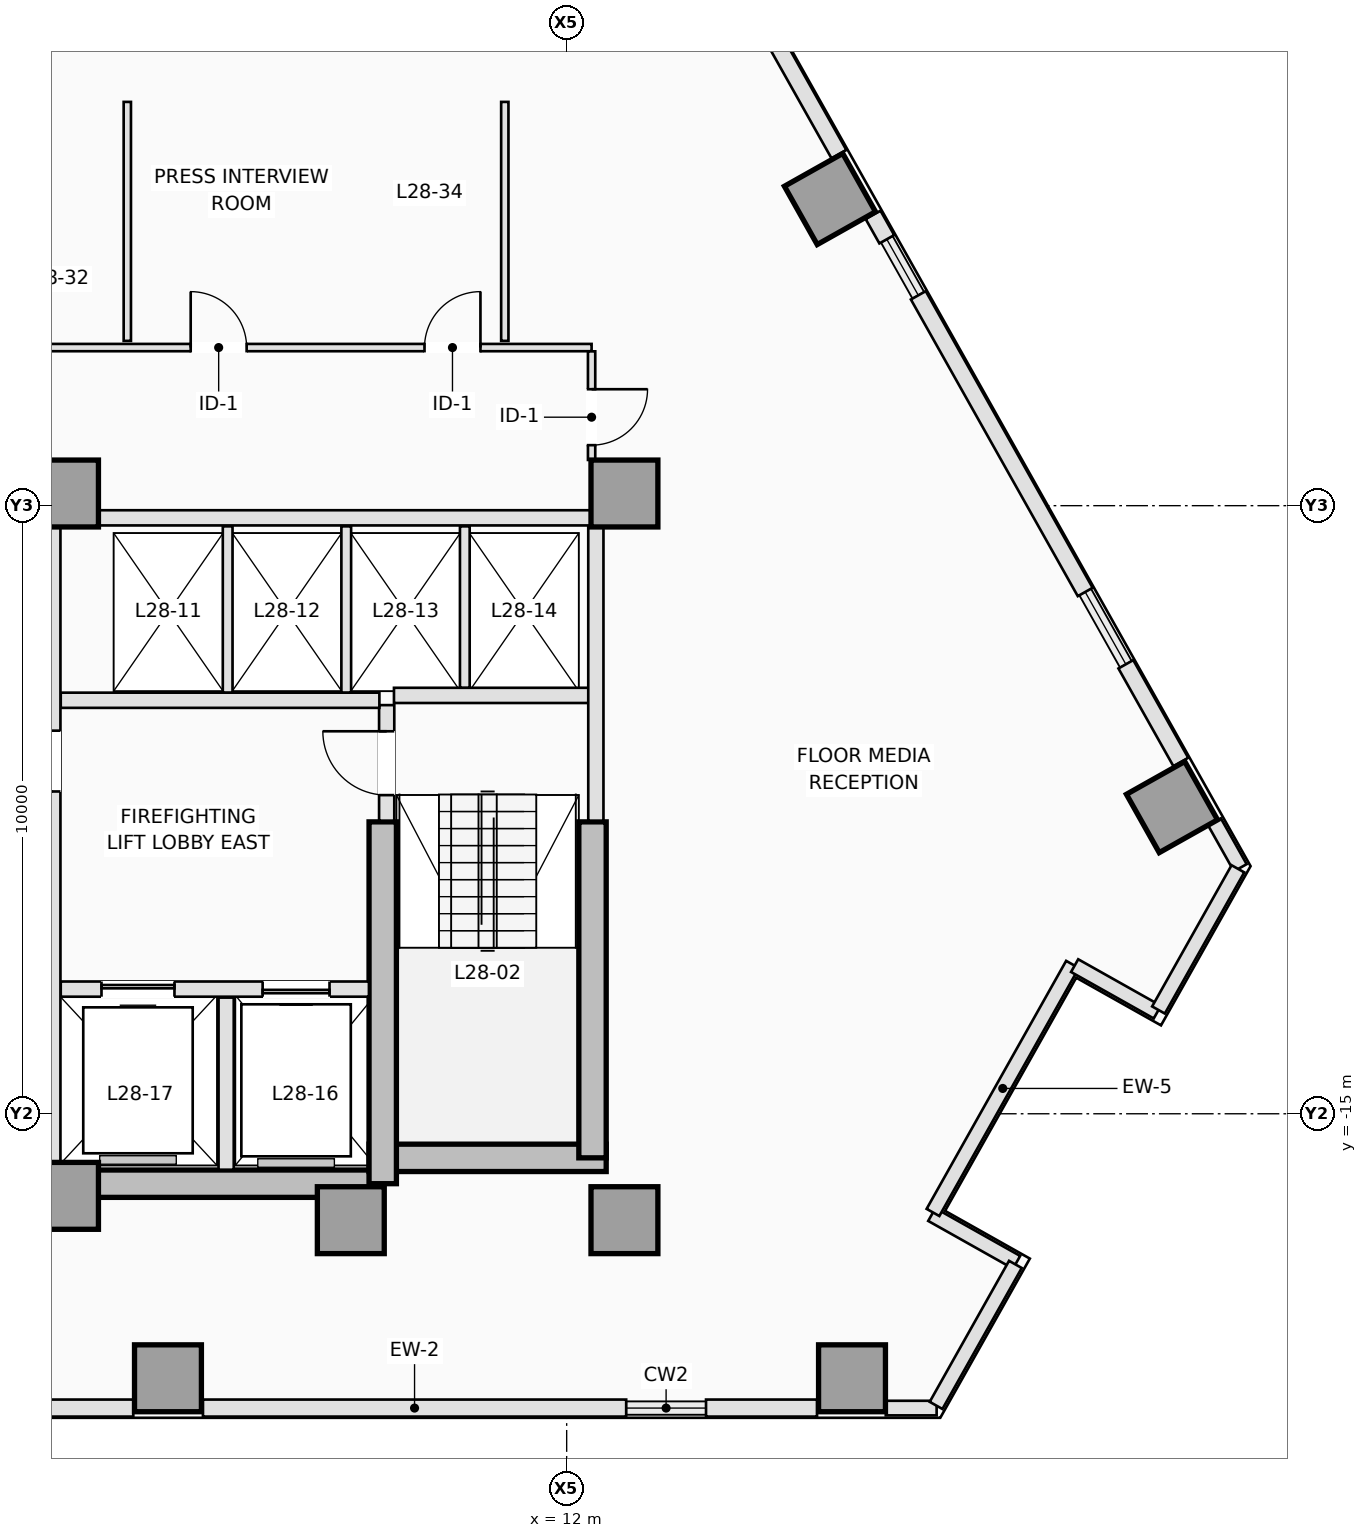
"""IFC4 building model, lengths in metres.
Left out: names, types, materials, properties, quantities, classifications, styles, units other than length and angle.
Written with IfcOpenShell. Run it as: python <this file> out.ifc"""

import sys

from ifc_helpers import new_model, si_unit, direction, frame, frame_2d, origin, origin_2d, place, context, subcontext, project, spatial, rectangle, extrude, element, fill, save


model = new_model("IFC4")
c1 = context("Model", 3, precision=1e-05, world=origin(), true_north=direction((0.0, 1.0)))
c2 = subcontext(c1, "Body", "Model", "MODEL_VIEW")
j1 = project(units=[si_unit("LENGTHUNIT", "METRE"), si_unit("PLANEANGLEUNIT", "RADIAN")], contexts=[c1])
p1 = place(None, origin())
s1 = spatial("IfcSite", under=j1, at=p1, CompositionType="ELEMENT")
p2 = place(p1, origin())
s2 = spatial("IfcBuilding", under=s1, at=p2, CompositionType="ELEMENT")
p3 = place(p2, frame((0.0, 0.0, 105.5)))
s3 = spatial("IfcBuildingStorey", under=s2, at=p3, CompositionType="ELEMENT", Elevation=105.5)
p4 = place(p3, frame((3.75, -16.15, 0.0), z_axis=(0.0, 0.0, 1.0), x_axis=(1.0, 0.0, 0.0)))
e1 = element("IfcWall", 1, at=p4, inside=s3, PredefinedType="SHEAR", context=c2, shape_type="SweptSolid", body=[
    extrude(rectangle(XDim=5.225, YDim=0.45, at=frame_2d((2.613, 0.0))), origin(), (0.0, 0.0, 1.0), 3.5),
])
p5 = place(p3, frame((8.75, -15.725, 0.0), z_axis=(0.0, 0.0, 1.0), x_axis=(1.0, 0.0, 0.0)))
e2 = element("IfcWall", 2, at=p5, inside=s3, PredefinedType="SHEAR", context=c2, shape_type="SweptSolid", body=[
    extrude(rectangle(XDim=3.9, YDim=0.45, at=frame_2d((1.95, 0.0))), origin(), (0.0, 0.0, 1.0), 3.5),
])
p6 = place(p3, frame((12.425, -15.725, 0.0), z_axis=(0.0, 0.0, 1.0), x_axis=(0.0, 1.0, 0.0)))
e3 = element("IfcWall", 3, at=p6, inside=s3, PredefinedType="SHEAR", context=c2, shape_type="SweptSolid", body=[
    extrude(rectangle(XDim=5.525, YDim=0.45, at=frame_2d((2.763, 0.0))), origin(), (0.0, 0.0, 1.0), 3.5),
])
p7 = place(p3, frame((8.975, -16.15, 0.0), z_axis=(0.0, 0.0, 1.0), x_axis=(0.0, 1.0, 0.0)))
e4 = element("IfcWall", 4, at=p7, inside=s3, PredefinedType="SHEAR", context=c2, shape_type="SweptSolid", body=[
    extrude(rectangle(XDim=5.95, YDim=0.45, at=frame_2d((2.975, 0.0))), origin(), (0.0, 0.0, 1.0), 3.5),
])
for number, where, z_axis, x_axis in (
    (5, (3.75, -16.35, 0.0), (0.0, 0.0, 1.0), (1.0, 0.0, 0.0)),
    (6, (8.45, -16.75, 0.0), (0.0, 0.0, 1.0), (1.0, 0.0, 0.0)),
    (7, (12.95, -16.75, 0.0), (0.0, 0.0, 1.0), (1.0, 0.0, 0.0)),
    (8, (3.75, -4.8, 0.0), (0.0, 0.0, 1.0), (1.0, 0.0, 0.0)),
    (9, (12.95, -4.8, 0.0), (0.0, 0.0, 1.0), (1.0, 0.0, 0.0)),
    (10, (5.443, -19.35, 0.0), (0.0, 0.0, 1.0), (0.0, 1.0, 0.0)),
    (11, (16.692, -19.35, 0.0), (0.0, 0.0, 1.0), (0.0, 1.0, 0.0)),
    (12, (21.955, -9.957, 0.0), (0.0, 0.0, 1.0), (0.872, 0.49, 0.0)),
    (13, (16.33, 0.043, 0.0), (0.0, 0.0, 1.0), (0.872, 0.49, 0.0)),
):
    element("IfcColumn", number, at=place(p3, frame(where, z_axis=z_axis, x_axis=x_axis)), inside=s3, PredefinedType="COLUMN", context=c2, shape_type="SweptSolid", body=[
        extrude(rectangle(XDim=1.1, YDim=1.1, at=origin_2d()), origin(), (0.0, 0.0, 1.0), 3.5),
    ])
p8 = place(p3, frame((18.084, -19.84, 0.0), z_axis=(0.0, 0.0, 1.0), x_axis=(-1.0, 0.0, 0.0)))
e14 = element("IfcWall", 14, at=p8, inside=s3, PredefinedType="STANDARD", context=c2, shape_type="SweptSolid", body=[
    extrude(rectangle(XDim=0.836, YDim=0.24, at=frame_2d((0.418, 0.0))), origin(), (0.0, 0.0, 1.0), 3.25),
])
p9 = place(p3, frame((16.117, -19.84, 0.0), z_axis=(0.0, 0.0, 1.0), x_axis=(-1.0, 0.0, 0.0)))
e15 = element("IfcWall", 15, at=p9, inside=s3, PredefinedType="STANDARD", context=c2, shape_type="SweptSolid", body=[
    extrude(rectangle(XDim=1.826, YDim=0.28, at=frame_2d((0.913, 0.0))), origin(), (0.0, 0.0, 1.0), 3.25),
])
p10 = place(p3, frame((12.979, -19.84, 0.0), z_axis=(0.0, 0.0, 1.0), x_axis=(-1.0, 0.0, 0.0)))
e16 = element("IfcWall", 16, at=p10, inside=s3, PredefinedType="STANDARD", context=c2, shape_type="SweptSolid", body=[
    extrude(rectangle(XDim=6.96, YDim=0.28, at=frame_2d((3.48, 0.0))), origin(), (0.0, 0.0, 1.0), 3.25),
])
p11 = place(p3, frame((4.873, -19.84, 0.0), z_axis=(0.0, 0.0, 1.0), x_axis=(-1.0, 0.0, 0.0)))
e17 = element("IfcWall", 17, at=p11, inside=s3, PredefinedType="STANDARD", context=c2, shape_type="SweptSolid", body=[
    extrude(rectangle(XDim=4.217, YDim=0.28, at=frame_2d((2.108, 0.0))), origin(), (0.0, 0.0, 1.0), 3.25),
])
p12 = place(p3, frame((22.654, -10.2, 0.0), z_axis=(0.0, 0.0, 1.0), x_axis=(0.490355003566, -0.871522788272, 0.0)))
e18 = element("IfcWall", 18, at=p12, inside=s3, PredefinedType="STANDARD", context=c2, shape_type="SweptSolid", body=[
    extrude(rectangle(XDim=0.865, YDim=0.24, at=frame_2d((0.433, 0.0))), origin(), (0.0, 0.0, 1.0), 3.25),
])
p13 = place(p3, frame((17.039, -0.218, 0.0), z_axis=(0.0, 0.0, 1.0), x_axis=(0.490009165718, -0.871717280724, 0.0)))
e19 = element("IfcWall", 19, at=p13, inside=s3, PredefinedType="STANDARD", context=c2, shape_type="SweptSolid", body=[
    extrude(rectangle(XDim=0.46, YDim=0.28, at=frame_2d((0.23, 0.0))), origin(), (0.0, 0.0, 1.0), 3.25),
])
p14 = place(p3, frame((17.783, -1.541, 0.0), z_axis=(0.0, 0.0, 1.0), x_axis=(0.490265381388, -0.871573207374, 0.0)))
e20 = element("IfcWall", 20, at=p14, inside=s3, PredefinedType="STANDARD", context=c2, shape_type="SweptSolid", body=[
    extrude(rectangle(XDim=5.597, YDim=0.28, at=frame_2d((2.799, 0.0))), origin(), (0.0, 0.0, 1.0), 3.25),
])
p15 = place(p3, frame((21.196, -7.608, 0.0), z_axis=(0.0, 0.0, 1.0), x_axis=(0.490280102884, -0.871564926277, 0.0)))
e21 = element("IfcWall", 21, at=p15, inside=s3, PredefinedType="STANDARD", context=c2, shape_type="SweptSolid", body=[
    extrude(rectangle(XDim=1.844, YDim=0.28, at=frame_2d((0.922, 0.0))), origin(), (0.0, 0.0, 1.0), 3.25),
])
p16 = place(p3, frame((14.37, 4.527, 0.0), z_axis=(0.0, 0.0, 1.0), x_axis=(0.490293592365, -0.871557337922, 0.0)))
e22 = element("IfcWall", 22, at=p16, inside=s3, PredefinedType="STANDARD", context=c2, shape_type="SweptSolid", body=[
    extrude(rectangle(XDim=4.299, YDim=0.28, at=frame_2d((2.15, 0.0))), origin(), (0.0, 0.0, 1.0), 3.25),
])
p17 = place(p3, frame((19.399, -17.442, 0.0), z_axis=(0.0, 0.0, 1.0), x_axis=(-0.871575537125, 0.490261239633, 0.0)))
e23 = element("IfcWall", 23, at=p17, inside=s3, PredefinedType="STANDARD", context=c2, shape_type="SweptSolid", body=[
    extrude(rectangle(XDim=1.6, YDim=0.24, at=frame_2d((0.8, 0.0))), origin(), (0.0, 0.0, 1.0), 3.25),
])
p18 = place(p3, frame((18.024, -16.623, 0.0), z_axis=(0.0, 0.0, 1.0), x_axis=(0.490273623647, 0.871568571001, 0.0)))
e24 = element("IfcWall", 24, at=p18, inside=s3, PredefinedType="STANDARD", context=c2, shape_type="SweptSolid", body=[
    extrude(rectangle(XDim=4.68, YDim=0.24, at=frame_2d((2.34, 0.0))), origin(), (0.0, 0.0, 1.0), 2.722),
])
p19 = place(p3, frame((20.354, -12.564, 0.0), z_axis=(0.0, 0.0, 1.0), x_axis=(0.871546278971, -0.490313250496, 0.0)))
e25 = element("IfcWall", 25, at=p19, inside=s3, PredefinedType="STANDARD", context=c2, shape_type="SweptSolid", body=[
    extrude(rectangle(XDim=1.56, YDim=0.24, at=frame_2d((0.78, 0.0))), origin(), (0.0, 0.0, 1.0), 3.25),
])
p20 = place(p3, frame((21.733, -13.294, 0.0), z_axis=(0.0, 0.0, 1.0), x_axis=(0.490265590412, 0.871573089797, 0.0)))
e26 = element("IfcWall", 26, at=p20, inside=s3, PredefinedType="STANDARD", context=c2, shape_type="SweptSolid", body=[
    extrude(rectangle(XDim=2.664, YDim=0.24, at=frame_2d((1.332, 0.0))), origin(), (0.0, 0.0, 1.0), 3.25),
])
p21 = place(p3, frame((18.075, -19.796, 0.0), z_axis=(0.0, 0.0, 1.0), x_axis=(0.490248170584, 0.871582888335, 0.0)))
e27 = element("IfcWall", 27, at=p21, inside=s3, PredefinedType="STANDARD", context=c2, shape_type="SweptSolid", body=[
    extrude(rectangle(XDim=2.661, YDim=0.24, at=frame_2d((1.331, 0.0))), origin(), (0.0, 0.0, 1.0), 3.25),
])
p22 = place(p3, frame((9.04, -10.18, 0.0), z_axis=(0.0, 0.0, 1.0), x_axis=(0.0, 1.0, 0.0)))
e28 = element("IfcWall", 28, at=p22, inside=s3, PredefinedType="PARTITIONING", context=c2, shape_type="SweptSolid", body=[
    extrude(rectangle(XDim=1.9, YDim=0.25, at=frame_2d((0.95, 0.0))), origin(), (0.0, 0.0, 1.0), 3.25),
])
p23 = place(p22, frame((0.42, 0.0, 0.0)))
e29 = element("IfcOpeningElement", 29, at=p23, cuts=e28, PredefinedType="OPENING", context=c2, shape_type="SweptSolid", body=[
    extrude(rectangle(XDim=1.05, YDim=2.15, at=frame_2d((0.525, 1.075))), frame((0.0, 0.135, 0.0), z_axis=(0.0, -1.0, 0.0), x_axis=(1.0, 0.0, 0.0)), (0.0, 0.0, 1.0), 0.27),
])
p24 = place(p3, frame((9.16, -8.12, 0.0), z_axis=(0.0, 0.0, 1.0), x_axis=(1.0, 0.0, 0.0)))
e30 = element("IfcWall", 30, at=p24, inside=s3, PredefinedType="PARTITIONING", context=c2, shape_type="SweptSolid", body=[
    extrude(rectangle(XDim=3.22, YDim=0.25, at=frame_2d((1.61, 0.0))), origin(), (0.0, 0.0, 1.0), 3.25),
])
p25 = place(p3, frame((12.48, -10.18, 0.0), z_axis=(0.0, 0.0, 1.0), x_axis=(0.0, 1.0, 0.0)))
e31 = element("IfcWall", 31, at=p25, inside=s3, PredefinedType="PARTITIONING", context=c2, shape_type="SweptSolid", body=[
    extrude(rectangle(XDim=4.828, YDim=0.25, at=frame_2d((2.414, 0.0))), origin(), (0.0, 0.0, 1.0), 3.25),
])
p26 = place(p3, frame((3.68, -12.95, 0.0), z_axis=(0.0, 0.0, 1.0), x_axis=(1.0, 0.0, 0.0)))
e32 = element("IfcWall", 32, at=p26, inside=s3, PredefinedType="PARTITIONING", context=c2, shape_type="SweptSolid", body=[
    extrude(rectangle(XDim=5.068, YDim=0.25, at=frame_2d((2.534, 0.0))), origin(), (0.0, 0.0, 1.0), 3.25),
])
p27 = place(p26, frame((3.32, 0.0, 0.0)))
e33 = element("IfcOpeningElement", 33, at=p27, cuts=e32, PredefinedType="OPENING", context=c2, shape_type="SweptSolid", body=[
    extrude(rectangle(XDim=1.1, YDim=2.15, at=frame_2d((0.55, 1.075))), frame((0.0, 0.135, 0.0), z_axis=(0.0, -1.0, 0.0), x_axis=(1.0, 0.0, 0.0)), (0.0, 0.0, 1.0), 0.27),
])
p28 = place(p26, frame((0.67, 0.0, 0.0)))
e34 = element("IfcOpeningElement", 34, at=p28, cuts=e32, PredefinedType="OPENING", context=c2, shape_type="SweptSolid", body=[
    extrude(rectangle(XDim=1.2, YDim=2.15, at=frame_2d((0.6, 1.075))), frame((0.0, 0.135, 0.0), z_axis=(0.0, -1.0, 0.0), x_axis=(1.0, 0.0, 0.0)), (0.0, 0.0, 1.0), 0.27),
])
p29 = place(p3, frame((6.4, -15.92, 0.0), z_axis=(0.0, 0.0, 1.0), x_axis=(0.0, 1.0, 0.0)))
e35 = element("IfcWall", 35, at=p29, inside=s3, PredefinedType="PARTITIONING", context=c2, shape_type="SweptSolid", body=[
    extrude(rectangle(XDim=2.83, YDim=0.25, at=frame_2d((1.415, 0.0))), origin(), (0.0, 0.0, 1.0), 3.25),
])
p30 = place(p3, frame((3.68, -8.2, 0.0), z_axis=(0.0, 0.0, 1.0), x_axis=(1.0, 0.0, 0.0)))
e36 = element("IfcWall", 36, at=p30, inside=s3, PredefinedType="PARTITIONING", context=c2, shape_type="SweptSolid", body=[
    extrude(rectangle(XDim=5.24, YDim=0.25, at=frame_2d((2.62, 0.0))), origin(), (0.0, 0.0, 1.0), 3.25),
])
p31 = place(p3, frame((3.55, -15.798, 0.0), z_axis=(0.0, 0.0, 1.0), x_axis=(0.0, 1.0, 0.0)))
e37 = element("IfcWall", 37, at=p31, inside=s3, PredefinedType="PARTITIONING", context=c2, shape_type="SweptSolid", body=[
    extrude(rectangle(XDim=10.446, YDim=0.25, at=frame_2d((5.223, 0.0))), origin(), (0.0, 0.0, 1.0), 3.25),
])
p32 = place(p31, frame((6.098, 0.0, 0.0)))
e38 = element("IfcOpeningElement", 38, at=p32, cuts=e37, PredefinedType="OPENING", context=c2, shape_type="SweptSolid", body=[
    extrude(rectangle(XDim=1.0, YDim=2.15, at=frame_2d((0.5, 1.075))), frame((0.0, 0.135, 0.0), z_axis=(0.0, -1.0, 0.0), x_axis=(1.0, 0.0, 0.0)), (0.0, 0.0, 1.0), 0.27),
])
p33 = place(p3, frame((4.302, -5.2, 0.0), z_axis=(0.0, 0.0, 1.0), x_axis=(1.0, 0.0, 0.0)))
e39 = element("IfcWall", 39, at=p33, inside=s3, PredefinedType="PARTITIONING", context=c2, shape_type="SweptSolid", body=[
    extrude(rectangle(XDim=8.096, YDim=0.25, at=frame_2d((4.048, 0.0))), origin(), (0.0, 0.0, 1.0), 3.25),
])
for number, where, z_axis, x_axis in (
    (40, (6.425, -8.073, 0.0), (0.0, 0.0, 1.0), (0.0, 1.0, 0.0)),
    (41, (8.375, -8.073, 0.0), (0.0, 0.0, 1.0), (0.0, 1.0, 0.0)),
):
    element("IfcWall", number, at=place(p3, frame(where, z_axis=z_axis, x_axis=x_axis)), inside=s3, PredefinedType="PARTITIONING", context=c2, shape_type="SweptSolid", body=[
        extrude(rectangle(XDim=2.733, YDim=0.16, at=frame_2d((1.366, 0.0))), origin(), (0.0, 0.0, 1.0), 3.25),
    ])
p34 = place(p3, frame((10.325, -7.993, 0.0), z_axis=(0.0, 0.0, 1.0), x_axis=(0.0, 1.0, 0.0)))
e42 = element("IfcWall", 42, at=p34, inside=s3, PredefinedType="PARTITIONING", context=c2, shape_type="SweptSolid", body=[
    extrude(rectangle(XDim=2.653, YDim=0.16, at=frame_2d((1.326, 0.0))), origin(), (0.0, 0.0, 1.0), 3.25),
])
p35 = place(p3, frame((1.572, -2.4, 0.0), z_axis=(0.0, 0.0, 1.0), x_axis=(1.0, 0.0, 0.0)))
e43 = element("IfcWall", 43, at=p35, inside=s3, PredefinedType="PARTITIONING", context=c2, shape_type="SweptSolid", body=[
    extrude(rectangle(XDim=10.838, YDim=0.12, at=frame_2d((5.419, 0.0))), origin(), (0.0, 0.0, 1.0), 3.25),
])
p36 = place(p35, frame((4.245, 0.0, 0.0)))
e44 = element("IfcOpeningElement", 44, at=p36, cuts=e43, PredefinedType="OPENING", context=c2, shape_type="SweptSolid", body=[
    extrude(rectangle(XDim=0.92, YDim=2.12, at=frame_2d((0.46, 1.06))), frame((0.0, 0.07, 0.0), z_axis=(0.0, -1.0, 0.0), x_axis=(1.0, 0.0, 0.0)), (0.0, 0.0, 1.0), 0.14),
])
p37 = place(p35, frame((8.09, 0.0, 0.0)))
e45 = element("IfcOpeningElement", 45, at=p37, cuts=e43, PredefinedType="OPENING", context=c2, shape_type="SweptSolid", body=[
    extrude(rectangle(XDim=0.92, YDim=2.12, at=frame_2d((0.46, 1.06))), frame((0.0, 0.07, 0.0), z_axis=(0.0, -1.0, 0.0), x_axis=(1.0, 0.0, 0.0)), (0.0, 0.0, 1.0), 0.14),
])
p38 = place(p3, frame((12.41, -2.462, 0.0), z_axis=(0.0, 0.0, 1.0), x_axis=(0.0, -1.0, 0.0)))
e46 = element("IfcWall", 46, at=p38, inside=s3, PredefinedType="PARTITIONING", context=c2, shape_type="SweptSolid", body=[
    extrude(rectangle(XDim=1.786, YDim=0.12, at=frame_2d((0.893, 0.0))), origin(), (0.0, 0.0, 1.0), 3.25),
])
p39 = place(p38, frame((0.623, 0.0, 0.0)))
e47 = element("IfcOpeningElement", 47, at=p39, cuts=e46, PredefinedType="OPENING", context=c2, shape_type="SweptSolid", body=[
    extrude(rectangle(XDim=0.92, YDim=2.12, at=frame_2d((0.46, 1.06))), frame((0.0, 0.07, 0.0), z_axis=(0.0, -1.0, 0.0), x_axis=(1.0, 0.0, 0.0)), (0.0, 0.0, 1.0), 0.14),
])
for number, where, z_axis, x_axis in (
    (48, (4.775, 1.64, 0.0), (0.0, 0.0, 1.0), (0.0, -1.0, 0.0)),
    (49, (10.982, 1.64, 0.0), (0.0, 0.0, 1.0), (0.0, -1.0, 0.0)),
):
    element("IfcWall", number, at=place(p3, frame(where, z_axis=z_axis, x_axis=x_axis)), inside=s3, PredefinedType="PARTITIONING", context=c2, shape_type="SweptSolid", body=[
        extrude(rectangle(XDim=3.93, YDim=0.12, at=frame_2d((1.965, 0.0))), origin(), (0.0, 0.0, 1.0), 3.25),
    ])
p40 = place(p27, origin())
e50 = element("IfcDoor", 50, at=p40, inside=s3, OperationType="SLIDING_TO_RIGHT", PredefinedType="DOOR", context=c2, shape_type="SweptSolid", body=[
    extrude(rectangle(XDim=1.1, YDim=2.15, at=frame_2d((0.55, 1.075))), frame((0.0, 0.025, 0.0), z_axis=(0.0, -1.0, 0.0), x_axis=(1.0, 0.0, 0.0)), (0.0, 0.0, 1.0), 0.05),
])
fill(e33, e50)
p41 = place(p28, origin())
e51 = element("IfcDoor", 51, at=p41, inside=s3, OperationType="SLIDING_TO_LEFT", PredefinedType="DOOR", context=c2, shape_type="SweptSolid", body=[
    extrude(rectangle(XDim=1.2, YDim=2.15, at=frame_2d((0.6, 1.075))), frame((0.0, 0.025, 0.0), z_axis=(0.0, -1.0, 0.0), x_axis=(1.0, 0.0, 0.0)), (0.0, 0.0, 1.0), 0.05),
])
fill(e34, e51)
p42 = place(p23, origin())
e52 = element("IfcDoor", 52, at=p42, inside=s3, OperationType="SINGLE_SWING_RIGHT", PredefinedType="DOOR", context=c2, shape_type="SweptSolid", body=[
    extrude(rectangle(XDim=1.05, YDim=2.15, at=frame_2d((0.525, 1.075))), frame((0.0, 0.025, 0.0), z_axis=(0.0, -1.0, 0.0), x_axis=(1.0, 0.0, 0.0)), (0.0, 0.0, 1.0), 0.05),
])
fill(e29, e52)
p43 = place(p32, origin())
e53 = element("IfcDoor", 53, at=p43, inside=s3, OperationType="SINGLE_SWING_LEFT", PredefinedType="DOOR", context=c2, shape_type="SweptSolid", body=[
    extrude(rectangle(XDim=1.0, YDim=2.15, at=frame_2d((0.5, 1.075))), frame((0.0, 0.025, 0.0), z_axis=(0.0, -1.0, 0.0), x_axis=(1.0, 0.0, 0.0)), (0.0, 0.0, 1.0), 0.05),
])
fill(e38, e53)
p44 = place(p36, origin())
e54 = element("IfcDoor", 54, at=p44, inside=s3, OperationType="SINGLE_SWING_LEFT", PredefinedType="DOOR", context=c2, shape_type="SweptSolid", body=[
    extrude(rectangle(XDim=0.92, YDim=2.12, at=frame_2d((0.46, 1.06))), frame((0.0, 0.025, 0.0), z_axis=(0.0, -1.0, 0.0), x_axis=(1.0, 0.0, 0.0)), (0.0, 0.0, 1.0), 0.05),
])
fill(e44, e54)
p45 = place(p37, origin())
e55 = element("IfcDoor", 55, at=p45, inside=s3, OperationType="SINGLE_SWING_RIGHT", PredefinedType="DOOR", context=c2, shape_type="SweptSolid", body=[
    extrude(rectangle(XDim=0.92, YDim=2.12, at=frame_2d((0.46, 1.06))), frame((0.0, 0.025, 0.0), z_axis=(0.0, -1.0, 0.0), x_axis=(1.0, 0.0, 0.0)), (0.0, 0.0, 1.0), 0.05),
])
fill(e45, e55)
p46 = place(p39, origin())
e56 = element("IfcDoor", 56, at=p46, inside=s3, OperationType="SINGLE_SWING_LEFT", PredefinedType="DOOR", context=c2, shape_type="SweptSolid", body=[
    extrude(rectangle(XDim=0.92, YDim=2.12, at=frame_2d((0.46, 1.06))), frame((0.0, 0.025, 0.0), z_axis=(0.0, -1.0, 0.0), x_axis=(1.0, 0.0, 0.0)), (0.0, 0.0, 1.0), 0.05),
])
fill(e47, e56)
save(model, sys.argv[1])
